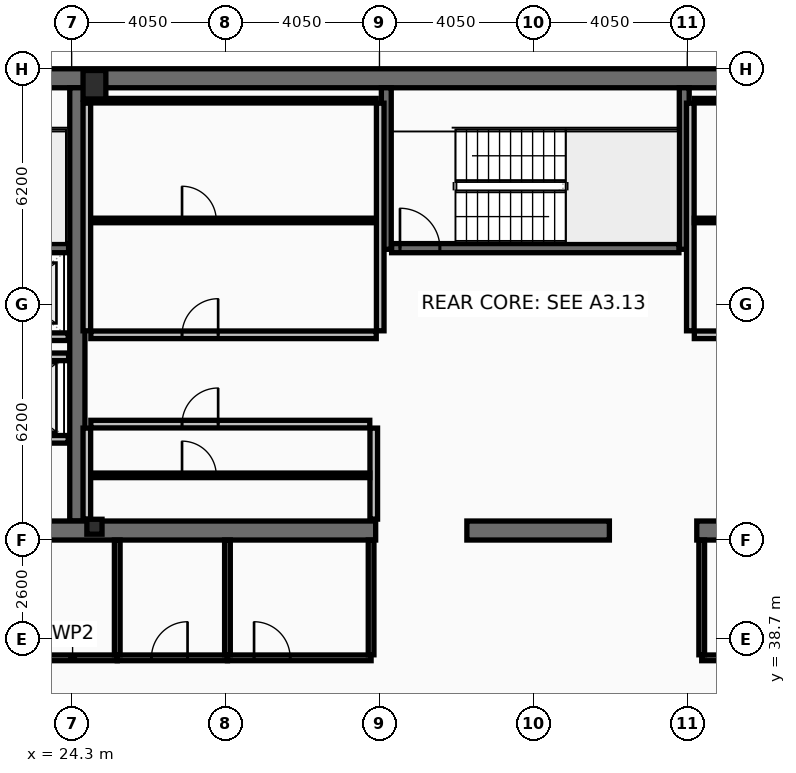
"""IFC4 building model, lengths in metres.
Left out: names, types, materials, properties, quantities, classifications, styles, units other than length and angle.
Written with IfcOpenShell. Run it as: python <this file> out.ifc"""

import sys

from ifc_helpers import new_model, si_unit, direction, frame, frame_2d, origin, origin_2d, place, context, subcontext, project, spatial, rectangle, hollow_rectangle, i_section, extrude, element, fill, save


model = new_model("IFC4")
c1 = context("Model", 3, precision=1e-05, world=origin(), true_north=direction((0.0, 1.0)))
c2 = subcontext(c1, "Body", "Model", "MODEL_VIEW")
j1 = project(units=[si_unit("LENGTHUNIT", "METRE"), si_unit("PLANEANGLEUNIT", "RADIAN")], contexts=[c1])
p1 = place(None, origin())
s1 = spatial("IfcSite", under=j1, at=p1, CompositionType="ELEMENT")
p2 = place(p1, origin())
s2 = spatial("IfcBuilding", under=s1, at=p2, CompositionType="ELEMENT")
p3 = place(p2, frame((0.0, 0.0, 280.6)))
s3 = spatial("IfcBuildingStorey", under=s2, at=p3, CompositionType="ELEMENT", Elevation=280.6)
p4 = place(p3, frame((16.2, 53.45, 0.0), z_axis=(0.0, 0.0, 1.0), x_axis=(1.0, 0.0, 0.0)))
e1 = element("IfcWall", 1, at=p4, inside=s3, PredefinedType="SHEAR", context=c2, shape_type="SweptSolid", body=[
    extrude(rectangle(XDim=40.5, YDim=0.5, at=frame_2d((20.25, 0.0))), origin(), (0.0, 0.0, 1.0), 3.44),
])
p5 = place(p3, frame((24.45, 41.8, 0.0), z_axis=(0.0, 0.0, 1.0), x_axis=(0.0, 1.0, 0.0)))
e2 = element("IfcWall", 2, at=p5, inside=s3, PredefinedType="SHEAR", context=c2, shape_type="SweptSolid", body=[
    extrude(rectangle(XDim=11.4, YDim=0.4, at=frame_2d((5.7, 0.0))), origin(), (0.0, 0.0, 1.0), 3.44),
])
p6 = place(p3, frame((32.3, 41.55, 0.0), z_axis=(0.0, 0.0, 1.0), x_axis=(-1.0, 0.0, 0.0)))
e3 = element("IfcWall", 3, at=p6, inside=s3, PredefinedType="SHEAR", context=c2, shape_type="SweptSolid", body=[
    extrude(rectangle(XDim=11.45, YDim=0.5, at=frame_2d((5.725, 0.0))), origin(), (0.0, 0.0, 1.0), 3.44),
])
p7 = place(p3, frame((38.45, 41.55, 0.0), z_axis=(0.0, 0.0, 1.0), x_axis=(-1.0, 0.0, 0.0)))
e4 = element("IfcWall", 4, at=p7, inside=s3, PredefinedType="SHEAR", context=c2, shape_type="SweptSolid", body=[
    extrude(rectangle(XDim=3.75, YDim=0.5, at=frame_2d((1.875, 0.0))), origin(), (0.0, 0.0, 1.0), 3.44),
])
p8 = place(p3, frame((52.05, 41.55, 0.0), z_axis=(0.0, 0.0, 1.0), x_axis=(-1.0, 0.0, 0.0)))
e5 = element("IfcWall", 5, at=p8, inside=s3, PredefinedType="SHEAR", context=c2, shape_type="SweptSolid", body=[
    extrude(rectangle(XDim=11.3, YDim=0.5, at=frame_2d((5.65, 0.0))), origin(), (0.0, 0.0, 1.0), 3.44),
])
for number, where, z_axis, x_axis in (
    (6, (32.58, 48.95, 0.0), (0.0, 0.0, 1.0), (0.0, 1.0, 0.0)),
    (7, (40.42, 48.95, 0.0), (0.0, 0.0, 1.0), (0.0, 1.0, 0.0)),
):
    element("IfcWall", number, at=place(p3, frame(where, z_axis=z_axis, x_axis=x_axis)), inside=s3, PredefinedType="SHEAR", context=c2, shape_type="SweptSolid", body=[
        extrude(rectangle(XDim=4.25, YDim=0.26, at=frame_2d((2.125, 0.0))), origin(), (0.0, 0.0, 1.0), 3.44),
    ])
p9 = place(p3, frame((16.7, 48.98, 0.0), z_axis=(0.0, 0.0, 1.0), x_axis=(1.0, 0.0, 0.0)))
e8 = element("IfcWall", 8, at=p9, inside=s3, PredefinedType="SHEAR", context=c2, shape_type="SweptSolid", body=[
    extrude(rectangle(XDim=7.52, YDim=0.24, at=frame_2d((3.76, 0.0))), origin(), (0.0, 0.0, 1.0), 3.44),
])
p10 = place(p9, frame((0.22, 0.0, 0.0)))
e9 = element("IfcOpeningElement", 9, at=p10, cuts=e8, PredefinedType="OPENING", context=c2, shape_type="SweptSolid", body=[
    extrude(rectangle(XDim=1.05, YDim=2.15, at=frame_2d((0.525, 1.075))), frame((0.0, 0.13, 0.0), z_axis=(0.0, -1.0, 0.0), x_axis=(1.0, 0.0, 0.0)), (0.0, 0.0, 1.0), 0.26),
])
p11 = place(p3, frame((32.72, 48.98, 0.0), z_axis=(0.0, 0.0, 1.0), x_axis=(1.0, 0.0, 0.0)))
e10 = element("IfcWall", 10, at=p11, inside=s3, PredefinedType="SHEAR", context=c2, shape_type="SweptSolid", body=[
    extrude(rectangle(XDim=7.56, YDim=0.24, at=frame_2d((3.78, 0.0))), origin(), (0.0, 0.0, 1.0), 3.44),
])
p12 = place(p11, frame((0.22, 0.0, 0.0)))
e11 = element("IfcOpeningElement", 11, at=p12, cuts=e10, PredefinedType="OPENING", context=c2, shape_type="SweptSolid", body=[
    extrude(rectangle(XDim=1.05, YDim=2.15, at=frame_2d((0.525, 1.075))), frame((0.0, 0.13, 0.0), z_axis=(0.0, -1.0, 0.0), x_axis=(1.0, 0.0, 0.0)), (0.0, 0.0, 1.0), 0.26),
])
p13 = place(p3, frame((24.9, 53.28, 0.0), z_axis=(0.0, 0.0, 1.0), x_axis=(1.0, 0.0, 0.0)))
e12 = element("IfcColumn", 12, at=p13, inside=s3, PredefinedType="COLUMN", context=c2, shape_type="SweptSolid", body=[
    extrude(hollow_rectangle(XDim=0.6, YDim=0.75, WallThickness=0.045, at=origin_2d()), origin(), (0.0, 0.0, 1.0), 3.6),
])
p14 = place(p3, frame((24.9, 41.65, 0.0), z_axis=(0.0, 0.0, 1.0), x_axis=(1.0, 0.0, 0.0)))
e13 = element("IfcColumn", 13, at=p14, inside=s3, PredefinedType="COLUMN", context=c2, shape_type="SweptSolid", body=[
    extrude(i_section(OverallWidth=0.399, OverallDepth=0.393, WebThickness=0.023, FlangeThickness=0.037, at=origin_2d()), origin(), (0.0, 0.0, 1.0), 3.6),
])
p15 = place(p3, frame((24.21, 43.95, 0.0), z_axis=(0.0, 0.0, 1.0), x_axis=(-1.0, 0.0, 0.0)))
e14 = element("IfcWall", 14, at=p15, inside=s3, PredefinedType="PARTITIONING", context=c2, shape_type="SweptSolid", body=[
    extrude(rectangle(XDim=2.97, YDim=0.2, at=frame_2d((1.485, 0.0))), origin(), (0.0, 0.0, 1.0), 3.44),
])
p16 = place(p15, frame((0.86, 0.0, 0.0)))
e15 = element("IfcOpeningElement", 15, at=p16, cuts=e14, PredefinedType="OPENING", context=c2, shape_type="SweptSolid", body=[
    extrude(rectangle(XDim=1.3, YDim=2.18, at=frame_2d((0.65, 1.09))), frame((0.0, 0.11, 0.0), z_axis=(0.0, -1.0, 0.0), x_axis=(1.0, 0.0, 0.0)), (0.0, 0.0, 1.0), 0.22),
])
p17 = place(p3, frame((24.21, 46.65, 0.0), z_axis=(0.0, 0.0, 1.0), x_axis=(-1.0, 0.0, 0.0)))
e16 = element("IfcWall", 16, at=p17, inside=s3, PredefinedType="PARTITIONING", context=c2, shape_type="SweptSolid", body=[
    extrude(rectangle(XDim=2.97, YDim=0.2, at=frame_2d((1.485, 0.0))), origin(), (0.0, 0.0, 1.0), 3.44),
])
p18 = place(p17, frame((0.91, 0.0, 0.0)))
e17 = element("IfcOpeningElement", 17, at=p18, cuts=e16, PredefinedType="OPENING", context=c2, shape_type="SweptSolid", body=[
    extrude(rectangle(XDim=1.2, YDim=2.18, at=frame_2d((0.6, 1.09))), frame((0.0, 0.11, 0.0), z_axis=(0.0, -1.0, 0.0), x_axis=(1.0, 0.0, 0.0)), (0.0, 0.0, 1.0), 0.22),
])
p19 = place(p3, frame((21.2, 46.12, 0.0), z_axis=(0.0, 0.0, 1.0), x_axis=(1.0, 0.0, 0.0)))
e18 = element("IfcWall", 18, at=p19, inside=s3, PredefinedType="PARTITIONING", context=c2, shape_type="SweptSolid", body=[
    extrude(rectangle(XDim=3.02, YDim=0.2, at=frame_2d((1.51, 0.0))), origin(), (0.0, 0.0, 1.0), 3.44),
])
for number, where, z_axis, x_axis in (
    (19, (24.7, 46.805, 0.0), (0.0, 0.0, 1.0), (0.0, 1.0, 0.0)),
    (20, (32.42, 46.805, 0.0), (0.0, 0.0, 1.0), (0.0, 1.0, 0.0)),
):
    element("IfcWall", number, at=place(p3, frame(where, z_axis=z_axis, x_axis=x_axis)), inside=s3, PredefinedType="PARTITIONING", context=c2, shape_type="SweptSolid", body=[
        extrude(rectangle(XDim=5.99, YDim=0.2, at=frame_2d((2.995, 0.0))), origin(), (0.0, 0.0, 1.0), 3.44),
    ])
p20 = place(p3, frame((24.805, 52.86, 0.0), z_axis=(0.0, 0.0, 1.0), x_axis=(1.0, 0.0, 0.0)))
e21 = element("IfcWall", 21, at=p20, inside=s3, PredefinedType="PARTITIONING", context=c2, shape_type="SweptSolid", body=[
    extrude(rectangle(XDim=7.51, YDim=0.12, at=frame_2d((3.755, 0.0))), origin(), (0.0, 0.0, 1.0), 3.44),
])
p21 = place(p3, frame((24.805, 49.709, 0.0), z_axis=(0.0, 0.0, 1.0), x_axis=(1.0, 0.0, 0.0)))
e22 = element("IfcWall", 22, at=p21, inside=s3, PredefinedType="PARTITIONING", context=c2, shape_type="SweptSolid", body=[
    extrude(rectangle(XDim=7.51, YDim=0.12, at=frame_2d((3.755, 0.0))), origin(), (0.0, 0.0, 1.0), 3.44),
])
p22 = place(p21, frame((2.4, 0.0, 0.0)))
e23 = element("IfcOpeningElement", 23, at=p22, cuts=e22, PredefinedType="OPENING", context=c2, shape_type="SweptSolid", body=[
    extrude(rectangle(XDim=0.9, YDim=2.05, at=frame_2d((0.45, 1.025))), frame((0.0, 0.07, 0.0), z_axis=(0.0, -1.0, 0.0), x_axis=(1.0, 0.0, 0.0)), (0.0, 0.0, 1.0), 0.14),
])
p23 = place(p3, frame((24.805, 46.7, 0.0), z_axis=(0.0, 0.0, 1.0), x_axis=(1.0, 0.0, 0.0)))
e24 = element("IfcWall", 24, at=p23, inside=s3, PredefinedType="PARTITIONING", context=c2, shape_type="SweptSolid", body=[
    extrude(rectangle(XDim=7.51, YDim=0.2, at=frame_2d((3.755, 0.0))), origin(), (0.0, 0.0, 1.0), 3.44),
])
p24 = place(p23, frame((2.4, 0.0, 0.0)))
e25 = element("IfcOpeningElement", 25, at=p24, cuts=e24, PredefinedType="OPENING", context=c2, shape_type="SweptSolid", body=[
    extrude(rectangle(XDim=0.95, YDim=2.1, at=frame_2d((0.475, 1.05))), frame((0.0, 0.11, 0.0), z_axis=(0.0, -1.0, 0.0), x_axis=(1.0, 0.0, 0.0)), (0.0, 0.0, 1.0), 0.22),
])
for number, where, z_axis, x_axis in (
    (26, (24.7, 41.85, 0.0), (0.0, 0.0, 1.0), (0.0, 1.0, 0.0)),
    (27, (32.25, 41.85, 0.0), (0.0, 0.0, 1.0), (0.0, 1.0, 0.0)),
):
    element("IfcWall", number, at=place(p3, frame(where, z_axis=z_axis, x_axis=x_axis)), inside=s3, PredefinedType="PARTITIONING", context=c2, shape_type="SweptSolid", body=[
        extrude(rectangle(XDim=2.395, YDim=0.2, at=frame_2d((1.198, 0.0))), origin(), (0.0, 0.0, 1.0), 3.44),
    ])
p25 = place(p3, frame((24.805, 43.002, 0.0), z_axis=(0.0, 0.0, 1.0), x_axis=(1.0, 0.0, 0.0)))
e28 = element("IfcWall", 28, at=p25, inside=s3, PredefinedType="PARTITIONING", context=c2, shape_type="SweptSolid", body=[
    extrude(rectangle(XDim=7.34, YDim=0.12, at=frame_2d((3.67, 0.0))), origin(), (0.0, 0.0, 1.0), 3.44),
])
p26 = place(p25, frame((2.4, 0.0, 0.0)))
e29 = element("IfcOpeningElement", 29, at=p26, cuts=e28, PredefinedType="OPENING", context=c2, shape_type="SweptSolid", body=[
    extrude(rectangle(XDim=0.9, YDim=2.05, at=frame_2d((0.45, 1.025))), frame((0.0, 0.07, 0.0), z_axis=(0.0, -1.0, 0.0), x_axis=(1.0, 0.0, 0.0)), (0.0, 0.0, 1.0), 0.14),
])
p27 = place(p3, frame((24.805, 44.35, 0.0), z_axis=(0.0, 0.0, 1.0), x_axis=(1.0, 0.0, 0.0)))
e30 = element("IfcWall", 30, at=p27, inside=s3, PredefinedType="PARTITIONING", context=c2, shape_type="SweptSolid", body=[
    extrude(rectangle(XDim=7.34, YDim=0.2, at=frame_2d((3.67, 0.0))), origin(), (0.0, 0.0, 1.0), 3.44),
])
p28 = place(p27, frame((2.4, 0.0, 0.0)))
e31 = element("IfcOpeningElement", 31, at=p28, cuts=e30, PredefinedType="OPENING", context=c2, shape_type="SweptSolid", body=[
    extrude(rectangle(XDim=0.95, YDim=2.1, at=frame_2d((0.475, 1.05))), frame((0.0, 0.11, 0.0), z_axis=(0.0, -1.0, 0.0), x_axis=(1.0, 0.0, 0.0)), (0.0, 0.0, 1.0), 0.22),
])
p29 = place(p3, frame((40.58, 46.805, 0.0), z_axis=(0.0, 0.0, 1.0), x_axis=(0.0, 1.0, 0.0)))
e32 = element("IfcWall", 32, at=p29, inside=s3, PredefinedType="PARTITIONING", context=c2, shape_type="SweptSolid", body=[
    extrude(rectangle(XDim=5.99, YDim=0.2, at=frame_2d((2.995, 0.0))), origin(), (0.0, 0.0, 1.0), 3.44),
])
p30 = place(p3, frame((40.685, 52.86, 0.0), z_axis=(0.0, 0.0, 1.0), x_axis=(1.0, 0.0, 0.0)))
e33 = element("IfcWall", 33, at=p30, inside=s3, PredefinedType="PARTITIONING", context=c2, shape_type="SweptSolid", body=[
    extrude(rectangle(XDim=7.35, YDim=0.12, at=frame_2d((3.675, 0.0))), origin(), (0.0, 0.0, 1.0), 3.44),
])
p31 = place(p3, frame((40.685, 49.709, 0.0), z_axis=(0.0, 0.0, 1.0), x_axis=(1.0, 0.0, 0.0)))
e34 = element("IfcWall", 34, at=p31, inside=s3, PredefinedType="PARTITIONING", context=c2, shape_type="SweptSolid", body=[
    extrude(rectangle(XDim=7.35, YDim=0.12, at=frame_2d((3.675, 0.0))), origin(), (0.0, 0.0, 1.0), 3.44),
])
p32 = place(p31, frame((2.4, 0.0, 0.0)))
e35 = element("IfcOpeningElement", 35, at=p32, cuts=e34, PredefinedType="OPENING", context=c2, shape_type="SweptSolid", body=[
    extrude(rectangle(XDim=0.9, YDim=2.05, at=frame_2d((0.45, 1.025))), frame((0.0, 0.07, 0.0), z_axis=(0.0, -1.0, 0.0), x_axis=(1.0, 0.0, 0.0)), (0.0, 0.0, 1.0), 0.14),
])
p33 = place(p3, frame((40.685, 46.7, 0.0), z_axis=(0.0, 0.0, 1.0), x_axis=(1.0, 0.0, 0.0)))
e36 = element("IfcWall", 36, at=p33, inside=s3, PredefinedType="PARTITIONING", context=c2, shape_type="SweptSolid", body=[
    extrude(rectangle(XDim=7.35, YDim=0.2, at=frame_2d((3.675, 0.0))), origin(), (0.0, 0.0, 1.0), 3.44),
])
p34 = place(p33, frame((2.4, 0.0, 0.0)))
e37 = element("IfcOpeningElement", 37, at=p34, cuts=e36, PredefinedType="OPENING", context=c2, shape_type="SweptSolid", body=[
    extrude(rectangle(XDim=0.95, YDim=2.1, at=frame_2d((0.475, 1.05))), frame((0.0, 0.11, 0.0), z_axis=(0.0, -1.0, 0.0), x_axis=(1.0, 0.0, 0.0)), (0.0, 0.0, 1.0), 0.22),
])
p35 = place(p3, frame((20.95, 38.2, 0.0), z_axis=(0.0, 0.0, 1.0), x_axis=(1.0, 0.0, 0.0)))
e38 = element("IfcWall", 38, at=p35, inside=s3, PredefinedType="PARTITIONING", context=c2, shape_type="SweptSolid", body=[
    extrude(rectangle(XDim=4.55, YDim=0.15, at=frame_2d((2.275, 0.0))), origin(), (0.0, 0.0, 1.0), 2.78),
])
p36 = place(p35, frame((0.9, 0.0, 0.0)))
e39 = element("IfcOpeningElement", 39, at=p36, cuts=e38, PredefinedType="OPENING", context=c2, shape_type="SweptSolid", body=[
    extrude(rectangle(XDim=0.95, YDim=2.05, at=frame_2d((0.475, 1.025))), frame((0.0, 0.085, 0.0), z_axis=(0.0, -1.0, 0.0), x_axis=(1.0, 0.0, 0.0)), (0.0, 0.0, 1.0), 0.17),
])
p37 = place(p3, frame((25.5, 38.2, 0.0), z_axis=(0.0, 0.0, 1.0), x_axis=(1.0, 0.0, 0.0)))
e40 = element("IfcWall", 40, at=p37, inside=s3, PredefinedType="PARTITIONING", context=c2, shape_type="SweptSolid", body=[
    extrude(rectangle(XDim=2.9, YDim=0.15, at=frame_2d((1.45, 0.0))), origin(), (0.0, 0.0, 1.0), 3.44),
])
p38 = place(p37, frame((0.9, 0.0, 0.0)))
e41 = element("IfcOpeningElement", 41, at=p38, cuts=e40, PredefinedType="OPENING", context=c2, shape_type="SweptSolid", body=[
    extrude(rectangle(XDim=0.95, YDim=2.05, at=frame_2d((0.475, 1.025))), frame((0.0, 0.085, 0.0), z_axis=(0.0, -1.0, 0.0), x_axis=(1.0, 0.0, 0.0)), (0.0, 0.0, 1.0), 0.17),
])
p39 = place(p3, frame((28.4, 38.2, 0.0), z_axis=(0.0, 0.0, 1.0), x_axis=(1.0, 0.0, 0.0)))
e42 = element("IfcWall", 42, at=p39, inside=s3, PredefinedType="PARTITIONING", context=c2, shape_type="SweptSolid", body=[
    extrude(rectangle(XDim=3.78, YDim=0.15, at=frame_2d((1.89, 0.0))), origin(), (0.0, 0.0, 1.0), 2.78),
])
p40 = place(p39, frame((0.7, 0.0, 0.0)))
e43 = element("IfcOpeningElement", 43, at=p40, cuts=e42, PredefinedType="OPENING", context=c2, shape_type="SweptSolid", body=[
    extrude(rectangle(XDim=0.95, YDim=2.05, at=frame_2d((0.475, 1.025))), frame((0.0, 0.085, 0.0), z_axis=(0.0, -1.0, 0.0), x_axis=(1.0, 0.0, 0.0)), (0.0, 0.0, 1.0), 0.17),
])
for number, where, z_axis, x_axis in (
    (44, (25.5, 38.28, 0.0), (0.0, 0.0, 1.0), (0.0, 1.0, 0.0)),
    (45, (28.4, 38.28, 0.0), (0.0, 0.0, 1.0), (0.0, 1.0, 0.0)),
    (46, (32.18, 38.28, 0.0), (0.0, 0.0, 1.0), (0.0, 1.0, 0.0)),
):
    element("IfcWall", number, at=place(p3, frame(where, z_axis=z_axis, x_axis=x_axis)), inside=s3, PredefinedType="PARTITIONING", context=c2, shape_type="SweptSolid", body=[
        extrude(rectangle(XDim=3.02, YDim=0.15, at=frame_2d((1.51, 0.0))), origin(), (0.0, 0.0, 1.0), 3.44),
    ])
p41 = place(p3, frame((40.88, 38.2, 0.0), z_axis=(0.0, 0.0, 1.0), x_axis=(1.0, 0.0, 0.0)))
e47 = element("IfcWall", 47, at=p41, inside=s3, PredefinedType="PARTITIONING", context=c2, shape_type="SweptSolid", body=[
    extrude(rectangle(XDim=4.67, YDim=0.15, at=frame_2d((2.335, 0.0))), origin(), (0.0, 0.0, 1.0), 2.78),
])
p42 = place(p41, frame((1.1, 0.0, 0.0)))
e48 = element("IfcOpeningElement", 48, at=p42, cuts=e47, PredefinedType="OPENING", context=c2, shape_type="SweptSolid", body=[
    extrude(rectangle(XDim=0.9, YDim=2.05, at=frame_2d((0.45, 1.025))), frame((0.0, 0.085, 0.0), z_axis=(0.0, -1.0, 0.0), x_axis=(1.0, 0.0, 0.0)), (0.0, 0.0, 1.0), 0.17),
])
p43 = place(p3, frame((40.88, 38.28, 0.0), z_axis=(0.0, 0.0, 1.0), x_axis=(0.0, 1.0, 0.0)))
e49 = element("IfcWall", 49, at=p43, inside=s3, PredefinedType="PARTITIONING", context=c2, shape_type="SweptSolid", body=[
    extrude(rectangle(XDim=3.02, YDim=0.15, at=frame_2d((1.51, 0.0))), origin(), (0.0, 0.0, 1.0), 3.44),
])
p44 = place(p12, origin())
e50 = element("IfcDoor", 50, at=p44, inside=s3, OperationType="SINGLE_SWING_LEFT", PredefinedType="DOOR", context=c2, shape_type="SweptSolid", body=[
    extrude(rectangle(XDim=1.05, YDim=2.15, at=frame_2d((0.525, 1.075))), frame((0.0, 0.025, 0.0), z_axis=(0.0, -1.0, 0.0), x_axis=(1.0, 0.0, 0.0)), (0.0, 0.0, 1.0), 0.05),
])
fill(e11, e50)
p45 = place(p22, origin())
e51 = element("IfcDoor", 51, at=p45, inside=s3, OperationType="SINGLE_SWING_LEFT", PredefinedType="DOOR", context=c2, shape_type="SweptSolid", body=[
    extrude(rectangle(XDim=0.9, YDim=2.05, at=frame_2d((0.45, 1.025))), frame((0.0, 0.025, 0.0), z_axis=(0.0, -1.0, 0.0), x_axis=(1.0, 0.0, 0.0)), (0.0, 0.0, 1.0), 0.05),
])
fill(e23, e51)
p46 = place(p24, origin())
e52 = element("IfcDoor", 52, at=p46, inside=s3, OperationType="SINGLE_SWING_RIGHT", PredefinedType="DOOR", context=c2, shape_type="SweptSolid", body=[
    extrude(rectangle(XDim=0.95, YDim=2.1, at=frame_2d((0.475, 1.05))), frame((0.0, 0.025, 0.0), z_axis=(0.0, -1.0, 0.0), x_axis=(1.0, 0.0, 0.0)), (0.0, 0.0, 1.0), 0.05),
])
fill(e25, e52)
p47 = place(p26, origin())
e53 = element("IfcDoor", 53, at=p47, inside=s3, OperationType="SINGLE_SWING_LEFT", PredefinedType="DOOR", context=c2, shape_type="SweptSolid", body=[
    extrude(rectangle(XDim=0.9, YDim=2.05, at=frame_2d((0.45, 1.025))), frame((0.0, 0.025, 0.0), z_axis=(0.0, -1.0, 0.0), x_axis=(1.0, 0.0, 0.0)), (0.0, 0.0, 1.0), 0.05),
])
fill(e29, e53)
p48 = place(p28, origin())
e54 = element("IfcDoor", 54, at=p48, inside=s3, OperationType="SINGLE_SWING_RIGHT", PredefinedType="DOOR", context=c2, shape_type="SweptSolid", body=[
    extrude(rectangle(XDim=0.95, YDim=2.1, at=frame_2d((0.475, 1.05))), frame((0.0, 0.025, 0.0), z_axis=(0.0, -1.0, 0.0), x_axis=(1.0, 0.0, 0.0)), (0.0, 0.0, 1.0), 0.05),
])
fill(e31, e54)
p49 = place(p38, origin())
e55 = element("IfcDoor", 55, at=p49, inside=s3, OperationType="SINGLE_SWING_RIGHT", PredefinedType="DOOR", context=c2, shape_type="SweptSolid", body=[
    extrude(rectangle(XDim=0.95, YDim=2.05, at=frame_2d((0.475, 1.025))), frame((0.0, 0.025, 0.0), z_axis=(0.0, -1.0, 0.0), x_axis=(1.0, 0.0, 0.0)), (0.0, 0.0, 1.0), 0.05),
])
fill(e41, e55)
p50 = place(p40, origin())
e56 = element("IfcDoor", 56, at=p50, inside=s3, OperationType="SINGLE_SWING_LEFT", PredefinedType="DOOR", context=c2, shape_type="SweptSolid", body=[
    extrude(rectangle(XDim=0.95, YDim=2.05, at=frame_2d((0.475, 1.025))), frame((0.0, 0.025, 0.0), z_axis=(0.0, -1.0, 0.0), x_axis=(1.0, 0.0, 0.0)), (0.0, 0.0, 1.0), 0.05),
])
fill(e43, e56)
save(model, sys.argv[1])
